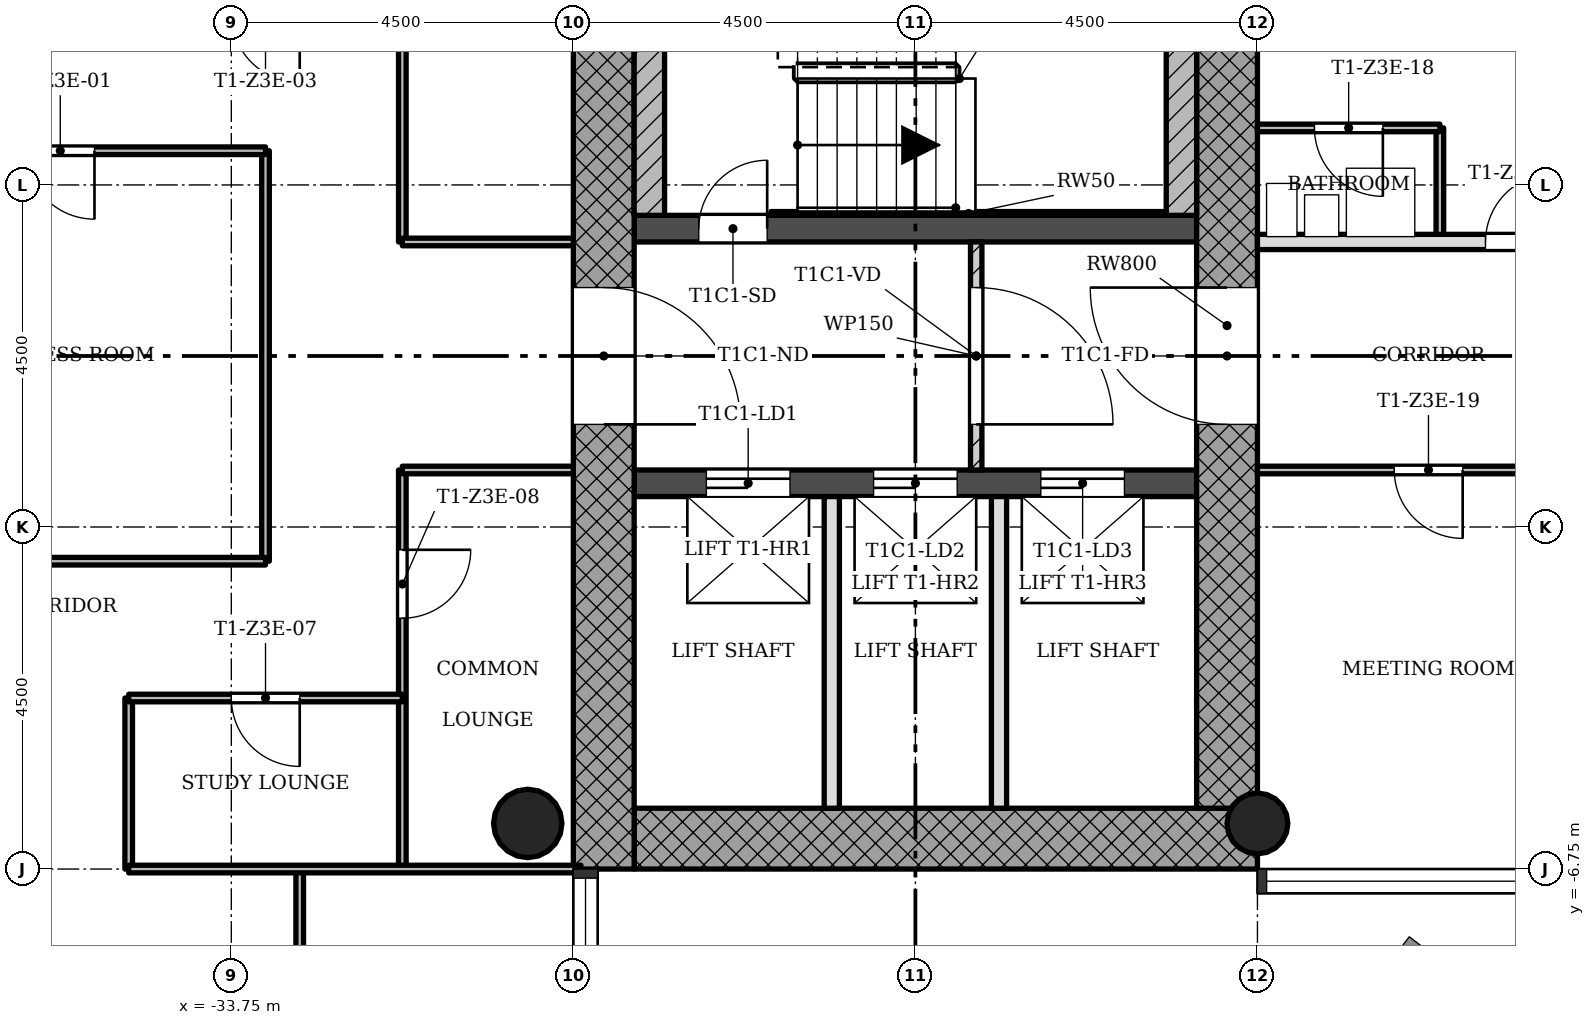
"""IFC4 building model, lengths in metres.
Left out: names, types, materials, properties, quantities, classifications, styles, units other than length and angle.
Written with IfcOpenShell. Run it as: python <this file> out.ifc"""

import sys

from ifc_helpers import new_model, si_unit, direction, frame, frame_2d, origin, origin_2d, place, context, subcontext, project, spatial, rectangle, hollow_circle, extrude, element, fill, save


model = new_model("IFC4")
c1 = context("Model", 3, precision=1e-05, world=origin(), true_north=direction((0.0, 1.0)))
c2 = subcontext(c1, "Body", "Model", "MODEL_VIEW")
j1 = project(units=[si_unit("LENGTHUNIT", "METRE"), si_unit("PLANEANGLEUNIT", "RADIAN")], contexts=[c1])
p1 = place(None, origin())
s1 = spatial("IfcSite", under=j1, at=p1, CompositionType="ELEMENT")
p2 = place(p1, origin())
s2 = spatial("IfcBuilding", under=s1, at=p2, CompositionType="ELEMENT")
p3 = place(p2, frame((0.0, 0.0, 177.9)))
s3 = spatial("IfcBuildingStorey", under=s2, at=p3, CompositionType="ELEMENT", Elevation=177.9)
p4 = place(p3, frame((-28.45, -6.35, 0.0), z_axis=(0.0, 0.0, 1.0), x_axis=(1.0, 0.0, 0.0)))
e1 = element("IfcWall", 1, at=p4, inside=s3, PredefinedType="SHEAR", context=c2, shape_type="SweptSolid", body=[
    extrude(rectangle(XDim=8.2, YDim=0.8, at=frame_2d((4.1, 0.0))), origin(), (0.0, 0.0, 1.0), 3.4),
])
p5 = place(p3, frame((-20.65, -5.95, 0.0), z_axis=(0.0, 0.0, 1.0), x_axis=(0.0, 1.0, 0.0)))
e2 = element("IfcWall", 2, at=p5, inside=s3, PredefinedType="SHEAR", context=c2, shape_type="SweptSolid", body=[
    extrude(rectangle(XDim=12.7, YDim=0.8, at=frame_2d((6.35, 0.0))), origin(), (0.0, 0.0, 1.0), 3.4),
])
p6 = place(p5, frame((5.05, 0.0, 0.0)))
e3 = element("IfcOpeningElement", 3, at=p6, cuts=e2, PredefinedType="OPENING", context=c2, shape_type="SweptSolid", body=[
    extrude(rectangle(XDim=1.8, YDim=2.1, at=frame_2d((0.9, 1.05))), frame((0.0, 0.41, 0.0), z_axis=(0.0, -1.0, 0.0), x_axis=(1.0, 0.0, 0.0)), (0.0, 0.0, 1.0), 0.82),
])
p7 = place(p3, frame((-28.85, 5.95, 0.0), z_axis=(0.0, 0.0, 1.0), x_axis=(0.0, -1.0, 0.0)))
e4 = element("IfcWall", 4, at=p7, inside=s3, PredefinedType="SHEAR", context=c2, shape_type="SweptSolid", body=[
    extrude(rectangle(XDim=12.7, YDim=0.8, at=frame_2d((6.35, 0.0))), origin(), (0.0, 0.0, 1.0), 3.4),
])
p8 = place(p7, frame((5.05, 0.0, 0.0)))
e5 = element("IfcOpeningElement", 5, at=p8, cuts=e4, PredefinedType="OPENING", context=c2, shape_type="SweptSolid", body=[
    extrude(rectangle(XDim=1.8, YDim=2.1, at=frame_2d((0.9, 1.05))), frame((0.0, 0.41, 0.0), z_axis=(0.0, -1.0, 0.0), x_axis=(1.0, 0.0, 0.0)), (0.0, 0.0, 1.0), 0.82),
])
p9 = place(p3, frame((-28.45, -1.675, 0.0), z_axis=(0.0, 0.0, 1.0), x_axis=(1.0, 0.0, 0.0)))
e6 = element("IfcWall", 6, at=p9, inside=s3, PredefinedType="SHEAR", context=c2, shape_type="SweptSolid", body=[
    extrude(rectangle(XDim=7.4, YDim=0.35, at=frame_2d((3.7, 0.0))), origin(), (0.0, 0.0, 1.0), 3.4),
])
p10 = place(p9, frame((0.95, 0.0, 0.0)))
e7 = element("IfcOpeningElement", 7, at=p10, cuts=e6, PredefinedType="OPENING", context=c2, shape_type="SweptSolid", body=[
    extrude(rectangle(XDim=1.1, YDim=2.1, at=frame_2d((0.55, 1.05))), frame((0.0, 0.185, 0.0), z_axis=(0.0, -1.0, 0.0), x_axis=(1.0, 0.0, 0.0)), (0.0, 0.0, 1.0), 0.37),
])
p11 = place(p9, frame((3.15, 0.0, 0.0)))
e8 = element("IfcOpeningElement", 8, at=p11, cuts=e6, PredefinedType="OPENING", context=c2, shape_type="SweptSolid", body=[
    extrude(rectangle(XDim=1.1, YDim=2.1, at=frame_2d((0.55, 1.05))), frame((0.0, 0.185, 0.0), z_axis=(0.0, -1.0, 0.0), x_axis=(1.0, 0.0, 0.0)), (0.0, 0.0, 1.0), 0.37),
])
p12 = place(p9, frame((5.35, 0.0, 0.0)))
e9 = element("IfcOpeningElement", 9, at=p12, cuts=e6, PredefinedType="OPENING", context=c2, shape_type="SweptSolid", body=[
    extrude(rectangle(XDim=1.1, YDim=2.1, at=frame_2d((0.55, 1.05))), frame((0.0, 0.185, 0.0), z_axis=(0.0, -1.0, 0.0), x_axis=(1.0, 0.0, 0.0)), (0.0, 0.0, 1.0), 0.37),
])
p13 = place(p3, frame((-28.45, 1.675, 0.0), z_axis=(0.0, 0.0, 1.0), x_axis=(1.0, 0.0, 0.0)))
e10 = element("IfcWall", 10, at=p13, inside=s3, PredefinedType="SHEAR", context=c2, shape_type="SweptSolid", body=[
    extrude(rectangle(XDim=7.4, YDim=0.35, at=frame_2d((3.7, 0.0))), origin(), (0.0, 0.0, 1.0), 3.4),
])
p14 = place(p13, frame((0.85, 0.0, 0.0)))
e11 = element("IfcOpeningElement", 11, at=p14, cuts=e10, PredefinedType="OPENING", context=c2, shape_type="SweptSolid", body=[
    extrude(rectangle(XDim=0.9, YDim=2.1, at=frame_2d((0.45, 1.05))), frame((0.0, 0.185, 0.0), z_axis=(0.0, -1.0, 0.0), x_axis=(1.0, 0.0, 0.0)), (0.0, 0.0, 1.0), 0.37),
])
p15 = place(p3, frame((-20.25, -6.15, 0.0), z_axis=(0.0, 0.0, 1.0), x_axis=(1.0, 0.0, 0.0)))
e12 = element("IfcColumn", 12, at=p15, inside=s3, PredefinedType="COLUMN", context=c2, shape_type="SweptSolid", body=[
    extrude(hollow_circle(Radius=0.4, WallThickness=0.028, at=origin_2d()), origin(), (0.0, 0.0, 1.0), 3.4),
])
p16 = place(p3, frame((-29.85, -6.15, 0.0), z_axis=(0.0, 0.0, 1.0), x_axis=(1.0, 0.0, 0.0)))
e13 = element("IfcColumn", 13, at=p16, inside=s3, PredefinedType="COLUMN", context=c2, shape_type="SweptSolid", body=[
    extrude(hollow_circle(Radius=0.45, WallThickness=0.032, at=origin_2d()), origin(), (0.0, 0.0, 1.0), 3.4),
])
p17 = place(p3, frame((-23.95, -1.5, 0.0), z_axis=(0.0, 0.0, 1.0), x_axis=(0.0, 1.0, 0.0)))
e14 = element("IfcWall", 14, at=p17, inside=s3, PredefinedType="PARTITIONING", context=c2, shape_type="SweptSolid", body=[
    extrude(rectangle(XDim=3.0, YDim=0.15, at=frame_2d((1.5, 0.0))), origin(), (0.0, 0.0, 1.0), 3.0),
])
p18 = place(p17, frame((0.6, 0.0, 0.0)))
e15 = element("IfcOpeningElement", 15, at=p18, cuts=e14, PredefinedType="OPENING", context=c2, shape_type="SweptSolid", body=[
    extrude(rectangle(XDim=1.8, YDim=2.1, at=frame_2d((0.9, 1.05))), frame((0.0, 0.085, 0.0), z_axis=(0.0, -1.0, 0.0), x_axis=(1.0, 0.0, 0.0)), (0.0, 0.0, 1.0), 0.17),
])
for number, where, z_axis, x_axis in (
    (16, (-25.85, -5.95, 0.0), (0.0, 0.0, 1.0), (0.0, 1.0, 0.0)),
    (17, (-23.65, -5.95, 0.0), (0.0, 0.0, 1.0), (0.0, 1.0, 0.0)),
):
    element("IfcWall", number, at=place(p3, frame(where, z_axis=z_axis, x_axis=x_axis)), inside=s3, PredefinedType="SOLIDWALL", context=c2, shape_type="SweptSolid", body=[
        extrude(rectangle(XDim=4.1, YDim=0.2, at=frame_2d((2.05, 0.0))), origin(), (0.0, 0.0, 1.0), 3.0),
    ])
p19 = place(p3, frame((-35.1, -6.75, 0.0), z_axis=(0.0, 0.0, 1.0), x_axis=(0.0, 1.0, 0.0)))
e18 = element("IfcWall", 18, at=p19, inside=s3, PredefinedType="PARTITIONING", context=c2, shape_type="SweptSolid", body=[
    extrude(rectangle(XDim=2.25, YDim=0.1, at=frame_2d((1.125, 0.0))), origin(), (0.0, 0.0, 1.0), 3.0),
])
p20 = place(p3, frame((-33.3, -2.7, 0.0), z_axis=(0.0, 0.0, 1.0), x_axis=(0.0, 1.0, 0.0)))
e19 = element("IfcWall", 19, at=p20, inside=s3, PredefinedType="PARTITIONING", context=c2, shape_type="SweptSolid", body=[
    extrude(rectangle(XDim=5.4, YDim=0.1, at=frame_2d((2.7, 0.0))), origin(), (0.0, 0.0, 1.0), 3.0),
])
p21 = place(p3, frame((-32.85, -15.75, 0.0), z_axis=(0.0, 0.0, 1.0), x_axis=(0.0, 1.0, 0.0)))
e20 = element("IfcWall", 20, at=p21, inside=s3, PredefinedType="PARTITIONING", context=c2, shape_type="SweptSolid", body=[
    extrude(rectangle(XDim=9.0, YDim=0.1, at=frame_2d((4.5, 0.0))), origin(), (0.0, 0.0, 1.0), 3.0),
])
p22 = place(p21, frame((5.55, 0.0, 0.0)))
e21 = element("IfcOpeningElement", 21, at=p22, cuts=e20, PredefinedType="OPENING", context=c2, shape_type="SweptSolid", body=[
    extrude(rectangle(XDim=0.9, YDim=2.1, at=frame_2d((0.45, 1.05))), frame((0.0, 0.06, 0.0), z_axis=(0.0, -1.0, 0.0), x_axis=(1.0, 0.0, 0.0)), (0.0, 0.0, 1.0), 0.12),
])
p23 = place(p3, frame((-31.5, -6.75, 0.0), z_axis=(0.0, 0.0, 1.0), x_axis=(0.0, 1.0, 0.0)))
e22 = element("IfcWall", 22, at=p23, inside=s3, PredefinedType="PARTITIONING", context=c2, shape_type="SweptSolid", body=[
    extrude(rectangle(XDim=5.25, YDim=0.1, at=frame_2d((2.625, 0.0))), origin(), (0.0, 0.0, 1.0), 3.0),
])
p24 = place(p23, frame((3.3, 0.0, 0.0)))
e23 = element("IfcOpeningElement", 23, at=p24, cuts=e22, PredefinedType="OPENING", context=c2, shape_type="SweptSolid", body=[
    extrude(rectangle(XDim=0.9, YDim=2.1, at=frame_2d((0.45, 1.05))), frame((0.0, 0.06, 0.0), z_axis=(0.0, -1.0, 0.0), x_axis=(1.0, 0.0, 0.0)), (0.0, 0.0, 1.0), 0.12),
])
p25 = place(p3, frame((-31.5, 1.5, 0.0), z_axis=(0.0, 0.0, 1.0), x_axis=(0.0, 1.0, 0.0)))
e24 = element("IfcWall", 24, at=p25, inside=s3, PredefinedType="PARTITIONING", context=c2, shape_type="SweptSolid", body=[
    extrude(rectangle(XDim=3.0, YDim=0.1, at=frame_2d((1.5, 0.0))), origin(), (0.0, 0.0, 1.0), 3.0),
])
p26 = place(p3, frame((-17.85, 1.5, 0.0), z_axis=(0.0, 0.0, 1.0), x_axis=(0.0, 1.0, 0.0)))
e25 = element("IfcWall", 25, at=p26, inside=s3, PredefinedType="PARTITIONING", context=c2, shape_type="SweptSolid", body=[
    extrude(rectangle(XDim=1.5, YDim=0.1, at=frame_2d((0.75, 0.0))), origin(), (0.0, 0.0, 1.0), 3.0),
])
p27 = place(p3, frame((-35.1, -6.75, 0.0), z_axis=(0.0, 0.0, 1.0), x_axis=(1.0, 0.0, 0.0)))
e26 = element("IfcWall", 26, at=p27, inside=s3, PredefinedType="PARTITIONING", context=c2, shape_type="SweptSolid", body=[
    extrude(rectangle(XDim=5.95, YDim=0.1, at=frame_2d((2.975, 0.0))), origin(), (0.0, 0.0, 1.0), 3.0),
])
p28 = place(p3, frame((-35.1, -4.5, 0.0), z_axis=(0.0, 0.0, 1.0), x_axis=(1.0, 0.0, 0.0)))
e27 = element("IfcWall", 27, at=p28, inside=s3, PredefinedType="PARTITIONING", context=c2, shape_type="SweptSolid", body=[
    extrude(rectangle(XDim=3.6, YDim=0.1, at=frame_2d((1.8, 0.0))), origin(), (0.0, 0.0, 1.0), 3.0),
])
p29 = place(p28, frame((1.35, 0.0, 0.0)))
e28 = element("IfcOpeningElement", 28, at=p29, cuts=e27, PredefinedType="OPENING", context=c2, shape_type="SweptSolid", body=[
    extrude(rectangle(XDim=0.9, YDim=2.1, at=frame_2d((0.45, 1.05))), frame((0.0, 0.06, 0.0), z_axis=(0.0, -1.0, 0.0), x_axis=(1.0, 0.0, 0.0)), (0.0, 0.0, 1.0), 0.12),
])
p30 = place(p3, frame((-38.7, -2.7, 0.0), z_axis=(0.0, 0.0, 1.0), x_axis=(1.0, 0.0, 0.0)))
e29 = element("IfcWall", 29, at=p30, inside=s3, PredefinedType="PARTITIONING", context=c2, shape_type="SweptSolid", body=[
    extrude(rectangle(XDim=5.4, YDim=0.1, at=frame_2d((2.7, 0.0))), origin(), (0.0, 0.0, 1.0), 3.0),
])
p31 = place(p3, frame((-31.5, -1.5, 0.0), z_axis=(0.0, 0.0, 1.0), x_axis=(1.0, 0.0, 0.0)))
e30 = element("IfcWall", 30, at=p31, inside=s3, PredefinedType="PARTITIONING", context=c2, shape_type="SweptSolid", body=[
    extrude(rectangle(XDim=2.25, YDim=0.1, at=frame_2d((1.125, 0.0))), origin(), (0.0, 0.0, 1.0), 3.0),
])
p32 = place(p3, frame((-20.25, -1.5, 0.0), z_axis=(0.0, 0.0, 1.0), x_axis=(1.0, 0.0, 0.0)))
e31 = element("IfcWall", 31, at=p32, inside=s3, PredefinedType="PARTITIONING", context=c2, shape_type="SweptSolid", body=[
    extrude(rectangle(XDim=4.5, YDim=0.1, at=frame_2d((2.25, 0.0))), origin(), (0.0, 0.0, 1.0), 3.0),
])
p33 = place(p32, frame((1.8, 0.0, 0.0)))
e32 = element("IfcOpeningElement", 32, at=p33, cuts=e31, PredefinedType="OPENING", context=c2, shape_type="SweptSolid", body=[
    extrude(rectangle(XDim=0.9, YDim=2.1, at=frame_2d((0.45, 1.05))), frame((0.0, 0.06, 0.0), z_axis=(0.0, -1.0, 0.0), x_axis=(1.0, 0.0, 0.0)), (0.0, 0.0, 1.0), 0.12),
])
p34 = place(p3, frame((-31.5, 1.5, 0.0), z_axis=(0.0, 0.0, 1.0), x_axis=(1.0, 0.0, 0.0)))
e33 = element("IfcWall", 33, at=p34, inside=s3, PredefinedType="PARTITIONING", context=c2, shape_type="SweptSolid", body=[
    extrude(rectangle(XDim=2.25, YDim=0.1, at=frame_2d((1.125, 0.0))), origin(), (0.0, 0.0, 1.0), 3.0),
])
p35 = place(p3, frame((-20.25, 1.5, 0.0), z_axis=(0.0, 0.0, 1.0), x_axis=(1.0, 0.0, 0.0)))
e34 = element("IfcWall", 34, at=p35, inside=s3, PredefinedType="SOLIDWALL", context=c2, shape_type="SweptSolid", body=[
    extrude(rectangle(XDim=4.5, YDim=0.2, at=frame_2d((2.25, 0.0))), origin(), (0.0, 0.0, 1.0), 3.0),
])
p36 = place(p35, frame((3.0, 0.0, 0.0)))
e35 = element("IfcOpeningElement", 35, at=p36, cuts=e34, PredefinedType="OPENING", context=c2, shape_type="SweptSolid", body=[
    extrude(rectangle(XDim=0.9, YDim=2.1, at=frame_2d((0.45, 1.05))), frame((0.0, 0.11, 0.0), z_axis=(0.0, -1.0, 0.0), x_axis=(1.0, 0.0, 0.0)), (0.0, 0.0, 1.0), 0.22),
])
p37 = place(p3, frame((-38.7, 2.7, 0.0), z_axis=(0.0, 0.0, 1.0), x_axis=(1.0, 0.0, 0.0)))
e36 = element("IfcWall", 36, at=p37, inside=s3, PredefinedType="PARTITIONING", context=c2, shape_type="SweptSolid", body=[
    extrude(rectangle(XDim=5.4, YDim=0.1, at=frame_2d((2.7, 0.0))), origin(), (0.0, 0.0, 1.0), 3.0),
])
p38 = place(p37, frame((2.25, 0.0, 0.0)))
e37 = element("IfcOpeningElement", 37, at=p38, cuts=e36, PredefinedType="OPENING", context=c2, shape_type="SweptSolid", body=[
    extrude(rectangle(XDim=0.9, YDim=2.1, at=frame_2d((0.45, 1.05))), frame((0.0, 0.06, 0.0), z_axis=(0.0, -1.0, 0.0), x_axis=(1.0, 0.0, 0.0)), (0.0, 0.0, 1.0), 0.12),
])
p39 = place(p3, frame((-20.25, 3.0, 0.0), z_axis=(0.0, 0.0, 1.0), x_axis=(1.0, 0.0, 0.0)))
e38 = element("IfcWall", 38, at=p39, inside=s3, PredefinedType="PARTITIONING", context=c2, shape_type="SweptSolid", body=[
    extrude(rectangle(XDim=2.4, YDim=0.1, at=frame_2d((1.2, 0.0))), origin(), (0.0, 0.0, 1.0), 3.0),
])
p40 = place(p39, frame((0.75, 0.0, 0.0)))
e39 = element("IfcOpeningElement", 39, at=p40, cuts=e38, PredefinedType="OPENING", context=c2, shape_type="SweptSolid", body=[
    extrude(rectangle(XDim=0.9, YDim=2.1, at=frame_2d((0.45, 1.05))), frame((0.0, 0.06, 0.0), z_axis=(0.0, -1.0, 0.0), x_axis=(1.0, 0.0, 0.0)), (0.0, 0.0, 1.0), 0.12),
])
for number, where, z_axis, x_axis in (
    (40, (-21.25, 1.85, 0.0), (0.0, 0.0, 1.0), (0.0, 1.0, 0.0)),
    (41, (-28.25, 1.85, 0.0), (0.0, 0.0, 1.0), (0.0, 1.0, 0.0)),
):
    element("IfcWall", number, at=place(p3, frame(where, z_axis=z_axis, x_axis=x_axis)), inside=s3, PredefinedType="SHEAR", context=c2, shape_type="SweptSolid", body=[
        extrude(rectangle(XDim=4.1, YDim=0.4, at=frame_2d((2.05, 0.0))), origin(), (0.0, 0.0, 1.0), 3.4),
    ])
p41 = place(p3, frame((-26.65, 1.875, 0.0), z_axis=(0.0, 0.0, 1.0), x_axis=(1.0, 0.0, 0.0)))
e42 = element("IfcWall", 42, at=p41, inside=s3, PredefinedType="SHEAR", context=c2, shape_type="SweptSolid", body=[
    extrude(rectangle(XDim=5.2, YDim=0.05, at=frame_2d((2.6, 0.0))), origin(), (0.0, 0.0, 1.0), 3.4),
])
p42 = place(p18, origin())
e43 = element("IfcDoor", 43, at=p42, inside=s3, OperationType="SINGLE_SWING_LEFT", PredefinedType="DOOR", context=c2, shape_type="SweptSolid", body=[
    extrude(rectangle(XDim=1.8, YDim=2.1, at=frame_2d((0.9, 1.05))), frame((0.0, 0.025, 0.0), z_axis=(0.0, -1.0, 0.0), x_axis=(1.0, 0.0, 0.0)), (0.0, 0.0, 1.0), 0.05),
])
fill(e15, e43)
p43 = place(p38, origin())
e44 = element("IfcDoor", 44, at=p43, inside=s3, OperationType="SINGLE_SWING_RIGHT", PredefinedType="DOOR", context=c2, shape_type="SweptSolid", body=[
    extrude(rectangle(XDim=0.9, YDim=2.1, at=frame_2d((0.45, 1.05))), frame((0.0, 0.025, 0.0), z_axis=(0.0, -1.0, 0.0), x_axis=(1.0, 0.0, 0.0)), (0.0, 0.0, 1.0), 0.05),
])
fill(e37, e44)
p44 = place(p29, origin())
e45 = element("IfcDoor", 45, at=p44, inside=s3, OperationType="SINGLE_SWING_RIGHT", PredefinedType="DOOR", context=c2, shape_type="SweptSolid", body=[
    extrude(rectangle(XDim=0.9, YDim=2.1, at=frame_2d((0.45, 1.05))), frame((0.0, 0.025, 0.0), z_axis=(0.0, -1.0, 0.0), x_axis=(1.0, 0.0, 0.0)), (0.0, 0.0, 1.0), 0.05),
])
fill(e28, e45)
p45 = place(p24, origin())
e46 = element("IfcDoor", 46, at=p45, inside=s3, OperationType="SINGLE_SWING_RIGHT", PredefinedType="DOOR", context=c2, shape_type="SweptSolid", body=[
    extrude(rectangle(XDim=0.9, YDim=2.1, at=frame_2d((0.45, 1.05))), frame((0.0, 0.025, 0.0), z_axis=(0.0, -1.0, 0.0), x_axis=(1.0, 0.0, 0.0)), (0.0, 0.0, 1.0), 0.05),
])
fill(e23, e46)
p46 = place(p36, origin())
e47 = element("IfcDoor", 47, at=p46, inside=s3, OperationType="SINGLE_SWING_LEFT", PredefinedType="DOOR", context=c2, shape_type="SweptSolid", body=[
    extrude(rectangle(XDim=0.9, YDim=2.1, at=frame_2d((0.45, 1.05))), frame((0.0, 0.025, 0.0), z_axis=(0.0, -1.0, 0.0), x_axis=(1.0, 0.0, 0.0)), (0.0, 0.0, 1.0), 0.05),
])
fill(e35, e47)
p47 = place(p40, origin())
e48 = element("IfcDoor", 48, at=p47, inside=s3, OperationType="SINGLE_SWING_RIGHT", PredefinedType="DOOR", context=c2, shape_type="SweptSolid", body=[
    extrude(rectangle(XDim=0.9, YDim=2.1, at=frame_2d((0.45, 1.05))), frame((0.0, 0.025, 0.0), z_axis=(0.0, -1.0, 0.0), x_axis=(1.0, 0.0, 0.0)), (0.0, 0.0, 1.0), 0.05),
])
fill(e39, e48)
p48 = place(p33, origin())
e49 = element("IfcDoor", 49, at=p48, inside=s3, OperationType="SINGLE_SWING_RIGHT", PredefinedType="DOOR", context=c2, shape_type="SweptSolid", body=[
    extrude(rectangle(XDim=0.9, YDim=2.1, at=frame_2d((0.45, 1.05))), frame((0.0, 0.025, 0.0), z_axis=(0.0, -1.0, 0.0), x_axis=(1.0, 0.0, 0.0)), (0.0, 0.0, 1.0), 0.05),
])
fill(e32, e49)
p49 = place(p14, origin())
e50 = element("IfcDoor", 50, at=p49, inside=s3, OperationType="SINGLE_SWING_LEFT", PredefinedType="DOOR", context=c2, shape_type="SweptSolid", body=[
    extrude(rectangle(XDim=0.9, YDim=2.1, at=frame_2d((0.45, 1.05))), frame((0.0, 0.025, 0.0), z_axis=(0.0, -1.0, 0.0), x_axis=(1.0, 0.0, 0.0)), (0.0, 0.0, 1.0), 0.05),
])
fill(e11, e50)
p50 = place(p10, origin())
e51 = element("IfcDoor", 51, at=p50, inside=s3, OperationType="SLIDING_TO_LEFT", PredefinedType="DOOR", context=c2, shape_type="SweptSolid", body=[
    extrude(rectangle(XDim=1.1, YDim=2.1, at=frame_2d((0.55, 1.05))), frame((0.0, 0.025, 0.0), z_axis=(0.0, -1.0, 0.0), x_axis=(1.0, 0.0, 0.0)), (0.0, 0.0, 1.0), 0.05),
])
fill(e7, e51)
p51 = place(p11, origin())
e52 = element("IfcDoor", 52, at=p51, inside=s3, OperationType="SLIDING_TO_LEFT", PredefinedType="DOOR", context=c2, shape_type="SweptSolid", body=[
    extrude(rectangle(XDim=1.1, YDim=2.1, at=frame_2d((0.55, 1.05))), frame((0.0, 0.025, 0.0), z_axis=(0.0, -1.0, 0.0), x_axis=(1.0, 0.0, 0.0)), (0.0, 0.0, 1.0), 0.05),
])
fill(e8, e52)
p52 = place(p12, origin())
e53 = element("IfcDoor", 53, at=p52, inside=s3, OperationType="SLIDING_TO_LEFT", PredefinedType="DOOR", context=c2, shape_type="SweptSolid", body=[
    extrude(rectangle(XDim=1.1, YDim=2.1, at=frame_2d((0.55, 1.05))), frame((0.0, 0.025, 0.0), z_axis=(0.0, -1.0, 0.0), x_axis=(1.0, 0.0, 0.0)), (0.0, 0.0, 1.0), 0.05),
])
fill(e9, e53)
p53 = place(p8, origin())
e54 = element("IfcDoor", 54, at=p53, inside=s3, OperationType="SINGLE_SWING_LEFT", PredefinedType="DOOR", context=c2, shape_type="SweptSolid", body=[
    extrude(rectangle(XDim=1.8, YDim=2.1, at=frame_2d((0.9, 1.05))), frame((0.0, 0.025, 0.0), z_axis=(0.0, -1.0, 0.0), x_axis=(1.0, 0.0, 0.0)), (0.0, 0.0, 1.0), 0.05),
])
fill(e5, e54)
p54 = place(p6, origin())
e55 = element("IfcDoor", 55, at=p54, inside=s3, OperationType="SINGLE_SWING_LEFT", PredefinedType="DOOR", context=c2, shape_type="SweptSolid", body=[
    extrude(rectangle(XDim=1.8, YDim=2.1, at=frame_2d((0.9, 1.05))), frame((0.0, 0.025, 0.0), z_axis=(0.0, -1.0, 0.0), x_axis=(1.0, 0.0, 0.0)), (0.0, 0.0, 1.0), 0.05),
])
fill(e3, e55)
save(model, sys.argv[1])
